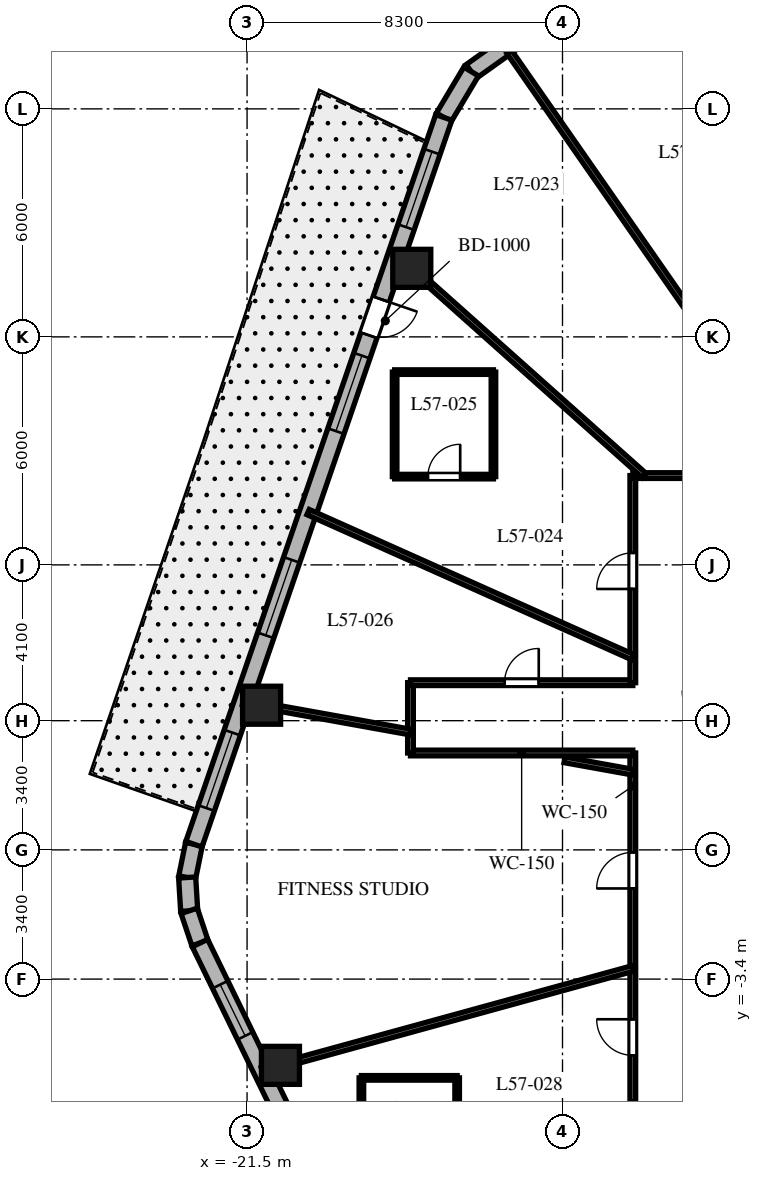
"""IFC4 building model, lengths in metres.
Left out: names, types, materials, properties, quantities, classifications, styles, units other than length and angle.
Written with IfcOpenShell. Run it as: python <this file> out.ifc"""

import sys

from ifc_helpers import new_model, si_unit, direction, frame, frame_2d, origin, origin_2d, place, context, subcontext, project, spatial, rectangle, extrude, element, fill, save


model = new_model("IFC4")
c1 = context("Model", 3, precision=1e-05, world=origin(), true_north=direction((0.0, 1.0)))
c2 = subcontext(c1, "Body", "Model", "MODEL_VIEW")
j1 = project(units=[si_unit("LENGTHUNIT", "METRE"), si_unit("PLANEANGLEUNIT", "RADIAN")], contexts=[c1])
p1 = place(None, origin())
s1 = spatial("IfcSite", under=j1, at=p1, CompositionType="ELEMENT")
p2 = place(p1, origin())
s2 = spatial("IfcBuilding", under=s1, at=p2, CompositionType="ELEMENT")
p3 = place(p2, frame((0.0, 0.0, 229.3)))
s3 = spatial("IfcBuildingStorey", under=s2, at=p3, CompositionType="ELEMENT", Elevation=229.3)
for number, where, z_axis, x_axis in (
    (1, (-17.166, 15.304, 0.0), (0.0, 0.0, 1.0), (1.0, 0.0, 0.0)),
    (2, (-21.118, 3.807, 0.0), (0.0, 0.0, 1.0), (1.0, 0.0, 0.0)),
    (3, (-20.622, -5.67, 0.0), (0.0, 0.0, 1.0), (1.0, 0.0, 0.0)),
):
    element("IfcColumn", number, at=place(p3, frame(where, z_axis=z_axis, x_axis=x_axis)), inside=s3, PredefinedType="COLUMN", context=c2, shape_type="SweptSolid", body=[
        extrude(rectangle(XDim=1.0, YDim=1.0, at=origin_2d()), origin(), (0.0, 0.0, 1.0), 3.8),
    ])
p4 = place(p3, frame((-14.478, 21.287, 0.0), z_axis=(0.0, 0.0, 1.0), x_axis=(-0.813888518617, -0.58102106611, 0.0)))
e4 = element("IfcWall", 4, at=p4, inside=s3, PredefinedType="SOLIDWALL", context=c2, shape_type="SweptSolid", body=[
    extrude(rectangle(XDim=1.383, YDim=0.45, at=frame_2d((0.691, 0.0))), origin(), (0.0, 0.0, 1.0), 3.5),
])
p5 = place(p3, frame((-15.604, 20.483, 0.0), z_axis=(0.0, 0.0, 1.0), x_axis=(-0.512222149036, -0.858852996756, 0.0)))
e5 = element("IfcWall", 5, at=p5, inside=s3, PredefinedType="SOLIDWALL", context=c2, shape_type="SweptSolid", body=[
    extrude(rectangle(XDim=1.406, YDim=0.45, at=frame_2d((0.703, 0.0))), origin(), (0.0, 0.0, 1.0), 3.5),
])
p6 = place(p3, frame((-22.898, 0.15, 0.0), z_axis=(0.0, 0.0, 1.0), x_axis=(-0.199055826889, -0.979988151858, 0.0)))
e6 = element("IfcWall", 6, at=p6, inside=s3, PredefinedType="SOLIDWALL", context=c2, shape_type="SweptSolid", body=[
    extrude(rectangle(XDim=0.894, YDim=0.45, at=frame_2d((0.447, 0.0))), origin(), (0.0, 0.0, 1.0), 3.5),
])
p7 = place(p3, frame((-23.076, -0.727, 0.0), z_axis=(0.0, 0.0, 1.0), x_axis=(0.060805222108, -0.998149650586, 0.0)))
e7 = element("IfcWall", 7, at=p7, inside=s3, PredefinedType="SOLIDWALL", context=c2, shape_type="SweptSolid", body=[
    extrude(rectangle(XDim=0.879, YDim=0.45, at=frame_2d((0.44, 0.0))), origin(), (0.0, 0.0, 1.0), 3.5),
])
p8 = place(p3, frame((-23.023, -1.604, 0.0), z_axis=(0.0, 0.0, 1.0), x_axis=(0.316801227695, -0.948491951537, 0.0)))
e8 = element("IfcWall", 8, at=p8, inside=s3, PredefinedType="SOLIDWALL", context=c2, shape_type="SweptSolid", body=[
    extrude(rectangle(XDim=0.894, YDim=0.45, at=frame_2d((0.447, 0.0))), origin(), (0.0, 0.0, 1.0), 3.5),
])
p9 = place(p3, frame((-16.324, 19.275, 0.0), z_axis=(0.0, 0.0, 1.0), x_axis=(-0.325083142304, -0.945685439557, 0.0)))
e9 = element("IfcWall", 9, at=p9, inside=s3, PredefinedType="SOLIDWALL", context=c2, shape_type="SweptSolid", body=[
    extrude(rectangle(XDim=20.224, YDim=0.45, at=frame_2d((10.112, 0.0))), origin(), (0.0, 0.0, 1.0), 3.5),
])
p10 = place(p9, frame((5.062, 0.0, 0.0)))
e10 = element("IfcOpeningElement", 10, at=p10, cuts=e9, PredefinedType="OPENING", context=c2, shape_type="SweptSolid", body=[
    extrude(rectangle(XDim=1.0, YDim=2.15, at=frame_2d((0.5, 1.075))), frame((0.0, 0.235, 0.0), z_axis=(0.0, -1.0, 0.0), x_axis=(1.0, 0.0, 0.0)), (0.0, 0.0, 1.0), 0.47),
])
p11 = place(p9, frame((0.953, 0.0, 0.8)))
e11 = element("IfcOpeningElement", 11, at=p11, cuts=e9, PredefinedType="OPENING", context=c2, shape_type="SweptSolid", body=[
    extrude(rectangle(XDim=2.1, YDim=1.85, at=frame_2d((1.05, 0.925))), frame((0.0, 0.235, 0.0), z_axis=(0.0, -1.0, 0.0), x_axis=(1.0, 0.0, 0.0)), (0.0, 0.0, 1.0), 0.47),
])
p12 = place(p9, frame((6.629, 0.0, 0.8)))
e12 = element("IfcOpeningElement", 12, at=p12, cuts=e9, PredefinedType="OPENING", context=c2, shape_type="SweptSolid", body=[
    extrude(rectangle(XDim=2.1, YDim=1.85, at=frame_2d((1.05, 0.925))), frame((0.0, 0.235, 0.0), z_axis=(0.0, -1.0, 0.0), x_axis=(1.0, 0.0, 0.0)), (0.0, 0.0, 1.0), 0.47),
])
p13 = place(p9, frame((12.312, 0.0, 0.8)))
e13 = element("IfcOpeningElement", 13, at=p13, cuts=e9, PredefinedType="OPENING", context=c2, shape_type="SweptSolid", body=[
    extrude(rectangle(XDim=2.1, YDim=1.85, at=frame_2d((1.05, 0.925))), frame((0.0, 0.235, 0.0), z_axis=(0.0, -1.0, 0.0), x_axis=(1.0, 0.0, 0.0)), (0.0, 0.0, 1.0), 0.47),
])
p14 = place(p9, frame((17.118, 0.0, 0.8)))
e14 = element("IfcOpeningElement", 14, at=p14, cuts=e9, PredefinedType="OPENING", context=c2, shape_type="SweptSolid", body=[
    extrude(rectangle(XDim=2.1, YDim=1.85, at=frame_2d((1.05, 0.925))), frame((0.0, 0.235, 0.0), z_axis=(0.0, -1.0, 0.0), x_axis=(1.0, 0.0, 0.0)), (0.0, 0.0, 1.0), 0.47),
])
p15 = place(p3, frame((-22.74, -2.452, 0.0), z_axis=(0.0, 0.0, 1.0), x_axis=(0.437753424814, -0.899095066755, 0.0)))
e15 = element("IfcWall", 15, at=p15, inside=s3, PredefinedType="SOLIDWALL", context=c2, shape_type="SweptSolid", body=[
    extrude(rectangle(XDim=19.137, YDim=0.45, at=frame_2d((9.569, 0.0))), origin(), (0.0, 0.0, 1.0), 3.5),
])
p16 = place(p15, frame((1.216, 0.0, 0.8)))
e16 = element("IfcOpeningElement", 16, at=p16, cuts=e15, PredefinedType="OPENING", context=c2, shape_type="SweptSolid", body=[
    extrude(rectangle(XDim=1.5, YDim=1.8, at=frame_2d((0.75, 0.9))), frame((0.0, 0.235, 0.0), z_axis=(0.0, -1.0, 0.0), x_axis=(1.0, 0.0, 0.0)), (0.0, 0.0, 1.0), 0.47),
])
p17 = place(p15, frame((6.105, 0.0, 0.8)))
e17 = element("IfcOpeningElement", 17, at=p17, cuts=e15, PredefinedType="OPENING", context=c2, shape_type="SweptSolid", body=[
    extrude(rectangle(XDim=1.5, YDim=1.8, at=frame_2d((0.75, 0.9))), frame((0.0, 0.235, 0.0), z_axis=(0.0, -1.0, 0.0), x_axis=(1.0, 0.0, 0.0)), (0.0, 0.0, 1.0), 0.47),
])
p18 = place(p15, frame((11.499, 0.0, 0.8)))
e18 = element("IfcOpeningElement", 18, at=p18, cuts=e15, PredefinedType="OPENING", context=c2, shape_type="SweptSolid", body=[
    extrude(rectangle(XDim=1.5, YDim=1.8, at=frame_2d((0.75, 0.9))), frame((0.0, 0.235, 0.0), z_axis=(0.0, -1.0, 0.0), x_axis=(1.0, 0.0, 0.0)), (0.0, 0.0, 1.0), 0.47),
])
p19 = place(p15, frame((16.473, 0.0, 0.8)))
e19 = element("IfcOpeningElement", 19, at=p19, cuts=e15, PredefinedType="OPENING", context=c2, shape_type="SweptSolid", body=[
    extrude(rectangle(XDim=1.5, YDim=1.8, at=frame_2d((0.75, 0.9))), frame((0.0, 0.235, 0.0), z_axis=(0.0, -1.0, 0.0), x_axis=(1.0, 0.0, 0.0)), (0.0, 0.0, 1.0), 0.47),
])
p20 = place(p3, frame((-11.35, -9.85, 0.0), z_axis=(0.0, 0.0, 1.0), x_axis=(0.0, 1.0, 0.0)))
e20 = element("IfcWall", 20, at=p20, inside=s3, PredefinedType="PARTITIONING", context=c2, shape_type="SweptSolid", body=[
    extrude(rectangle(XDim=12.4, YDim=0.15, at=frame_2d((6.2, 0.0))), origin(), (0.0, 0.0, 1.0), 2.99),
])
p21 = place(p20, frame((8.835, 0.0, 0.0)))
e21 = element("IfcOpeningElement", 21, at=p21, cuts=e20, PredefinedType="OPENING", context=c2, shape_type="SweptSolid", body=[
    extrude(rectangle(XDim=0.95, YDim=2.03, at=frame_2d((0.475, 1.015))), frame((0.0, 0.085, 0.0), z_axis=(0.0, -1.0, 0.0), x_axis=(1.0, 0.0, 0.0)), (0.0, 0.0, 1.0), 0.17),
])
p22 = place(p20, frame((4.443, 0.0, 0.0)))
e22 = element("IfcOpeningElement", 22, at=p22, cuts=e20, PredefinedType="OPENING", context=c2, shape_type="SweptSolid", body=[
    extrude(rectangle(XDim=0.95, YDim=2.03, at=frame_2d((0.475, 1.015))), frame((0.0, 0.085, 0.0), z_axis=(0.0, -1.0, 0.0), x_axis=(1.0, 0.0, 0.0)), (0.0, 0.0, 1.0), 0.17),
])
p23 = place(p20, frame((1.242, 0.0, 0.0)))
e23 = element("IfcOpeningElement", 23, at=p23, cuts=e20, PredefinedType="OPENING", context=c2, shape_type="SweptSolid", body=[
    extrude(rectangle(XDim=0.9, YDim=2.03, at=frame_2d((0.45, 1.015))), frame((0.0, 0.085, 0.0), z_axis=(0.0, -1.0, 0.0), x_axis=(1.0, 0.0, 0.0)), (0.0, 0.0, 1.0), 0.17),
])
p24 = place(p3, frame((-11.35, 2.55, 0.0), z_axis=(0.0, 0.0, 1.0), x_axis=(-1.0, 0.0, 0.0)))
e24 = element("IfcWall", 24, at=p24, inside=s3, PredefinedType="PARTITIONING", context=c2, shape_type="SweptSolid", body=[
    extrude(rectangle(XDim=5.85, YDim=0.15, at=frame_2d((2.925, 0.0))), origin(), (0.0, 0.0, 1.0), 2.94),
])
p25 = place(p3, frame((-17.2, 2.55, 0.0), z_axis=(0.0, 0.0, 1.0), x_axis=(0.0, 1.0, 0.0)))
e25 = element("IfcWall", 25, at=p25, inside=s3, PredefinedType="PARTITIONING", context=c2, shape_type="SweptSolid", body=[
    extrude(rectangle(XDim=1.85, YDim=0.15, at=frame_2d((0.925, 0.0))), origin(), (0.0, 0.0, 1.0), 2.94),
])
p26 = place(p3, frame((-17.2, 4.4, 0.0), z_axis=(0.0, 0.0, 1.0), x_axis=(1.0, 0.0, 0.0)))
e26 = element("IfcWall", 26, at=p26, inside=s3, PredefinedType="PARTITIONING", context=c2, shape_type="SweptSolid", body=[
    extrude(rectangle(XDim=5.85, YDim=0.15, at=frame_2d((2.925, 0.0))), origin(), (0.0, 0.0, 1.0), 2.94),
])
p27 = place(p26, frame((2.475, 0.0, 0.0)))
e27 = element("IfcOpeningElement", 27, at=p27, cuts=e26, PredefinedType="OPENING", context=c2, shape_type="SweptSolid", body=[
    extrude(rectangle(XDim=0.9, YDim=2.03, at=frame_2d((0.45, 1.015))), frame((0.0, 0.085, 0.0), z_axis=(0.0, -1.0, 0.0), x_axis=(1.0, 0.0, 0.0)), (0.0, 0.0, 1.0), 0.17),
])
p28 = place(p3, frame((-11.35, 4.4, 0.0), z_axis=(0.0, 0.0, 1.0), x_axis=(0.0, 1.0, 0.0)))
e28 = element("IfcWall", 28, at=p28, inside=s3, PredefinedType="PARTITIONING", context=c2, shape_type="SweptSolid", body=[
    extrude(rectangle(XDim=5.45, YDim=0.15, at=frame_2d((2.725, 0.0))), origin(), (0.0, 0.0, 1.0), 2.99),
])
p29 = place(p28, frame((2.466, 0.0, 0.0)))
e29 = element("IfcOpeningElement", 29, at=p29, cuts=e28, PredefinedType="OPENING", context=c2, shape_type="SweptSolid", body=[
    extrude(rectangle(XDim=0.95, YDim=2.03, at=frame_2d((0.475, 1.015))), frame((0.0, 0.085, 0.0), z_axis=(0.0, -1.0, 0.0), x_axis=(1.0, 0.0, 0.0)), (0.0, 0.0, 1.0), 0.17),
])
p30 = place(p3, frame((-11.35, 9.85, 0.0), z_axis=(0.0, 0.0, 1.0), x_axis=(1.0, 0.0, 0.0)))
e30 = element("IfcWall", 30, at=p30, inside=s3, PredefinedType="PARTITIONING", context=c2, shape_type="SweptSolid", body=[
    extrude(rectangle(XDim=10.43, YDim=0.15, at=frame_2d((5.215, 0.0))), origin(), (0.0, 0.0, 1.0), 2.99),
])
p31 = place(p30, frame((8.387, 0.0, 0.0)))
e31 = element("IfcOpeningElement", 31, at=p31, cuts=e30, PredefinedType="OPENING", context=c2, shape_type="SweptSolid", body=[
    extrude(rectangle(XDim=0.9, YDim=2.03, at=frame_2d((0.45, 1.015))), frame((0.0, 0.085, 0.0), z_axis=(0.0, -1.0, 0.0), x_axis=(1.0, 0.0, 0.0)), (0.0, 0.0, 1.0), 0.17),
])
p32 = place(p30, frame((5.525, 0.0, 0.0)))
e32 = element("IfcOpeningElement", 32, at=p32, cuts=e30, PredefinedType="OPENING", context=c2, shape_type="SweptSolid", body=[
    extrude(rectangle(XDim=0.9, YDim=2.03, at=frame_2d((0.45, 1.015))), frame((0.0, 0.085, 0.0), z_axis=(0.0, -1.0, 0.0), x_axis=(1.0, 0.0, 0.0)), (0.0, 0.0, 1.0), 0.17),
])
p33 = place(p30, frame((1.921, 0.0, 0.0)))
e33 = element("IfcOpeningElement", 33, at=p33, cuts=e30, PredefinedType="OPENING", context=c2, shape_type="SweptSolid", body=[
    extrude(rectangle(XDim=0.9, YDim=2.03, at=frame_2d((0.45, 1.015))), frame((0.0, 0.085, 0.0), z_axis=(0.0, -1.0, 0.0), x_axis=(1.0, 0.0, 0.0)), (0.0, 0.0, 1.0), 0.17),
])
p34 = place(p3, frame((-6.849, 9.85, 0.0), z_axis=(0.0, 0.0, 1.0), x_axis=(-0.570871709026, 0.821039275451, 0.0)))
e34 = element("IfcWall", 34, at=p34, inside=s3, PredefinedType="PARTITIONING", context=c2, shape_type="SweptSolid", body=[
    extrude(rectangle(XDim=13.582, YDim=0.15, at=frame_2d((6.791, 0.0))), origin(), (0.0, 0.0, 1.0), 2.74),
])
p35 = place(p3, frame((-11.048, 9.85, 0.0), z_axis=(0.0, 0.0, 1.0), x_axis=(-0.746444434655, 0.665447748492, 0.0)))
e35 = element("IfcWall", 35, at=p35, inside=s3, PredefinedType="PARTITIONING", context=c2, shape_type="SweptSolid", body=[
    extrude(rectangle(XDim=8.732, YDim=0.15, at=frame_2d((4.366, 0.0))), origin(), (0.0, 0.0, 1.0), 2.74),
])
p36 = place(p3, frame((-11.35, 5.072, 0.0), z_axis=(0.0, 0.0, 1.0), x_axis=(-0.912980177983, 0.408003914944, 0.0)))
e36 = element("IfcWall", 36, at=p36, inside=s3, PredefinedType="PARTITIONING", context=c2, shape_type="SweptSolid", body=[
    extrude(rectangle(XDim=9.358, YDim=0.15, at=frame_2d((4.679, 0.0))), origin(), (0.0, 0.0, 1.0), 2.74),
])
p37 = place(p3, frame((-11.35, 2.046, 0.0), z_axis=(0.0, 0.0, 1.0), x_axis=(-0.984127783205, 0.177461281195, 0.0)))
e37 = element("IfcWall", 37, at=p37, inside=s3, PredefinedType="PARTITIONING", context=c2, shape_type="SweptSolid", body=[
    extrude(rectangle(XDim=1.826, YDim=0.15, at=frame_2d((0.913, 0.0))), origin(), (0.0, 0.0, 1.0), 3.5),
])
p38 = place(p3, frame((-17.2, 3.101, 0.0), z_axis=(0.0, 0.0, 1.0), x_axis=(-0.98413465883, 0.177423147559, 0.0)))
e38 = element("IfcWall", 38, at=p38, inside=s3, PredefinedType="PARTITIONING", context=c2, shape_type="SweptSolid", body=[
    extrude(rectangle(XDim=4.482, YDim=0.15, at=frame_2d((2.241, 0.0))), origin(), (0.0, 0.0, 1.0), 2.74),
])
p39 = place(p3, frame((-11.35, -3.121, 0.0), z_axis=(0.0, 0.0, 1.0), x_axis=(-0.964212793822, -0.265129568758, 0.0)))
e39 = element("IfcWall", 39, at=p39, inside=s3, PredefinedType="PARTITIONING", context=c2, shape_type="SweptSolid", body=[
    extrude(rectangle(XDim=10.12, YDim=0.15, at=frame_2d((5.06, 0.0))), origin(), (0.0, 0.0, 1.0), 2.74),
])
p40 = place(p3, frame((-17.617, 9.823, 0.0), z_axis=(0.0, 0.0, 1.0), x_axis=(1.0, 0.0, 0.0)))
e40 = element("IfcWall", 40, at=p40, inside=s3, PredefinedType="PARTITIONING", context=c2, shape_type="SweptSolid", body=[
    extrude(rectangle(XDim=2.6, YDim=0.12, at=frame_2d((1.3, 0.0))), origin(), (0.0, 0.0, 1.0), 3.072),
])
p41 = place(p40, frame((0.875, 0.0, 0.0)))
e41 = element("IfcOpeningElement", 41, at=p41, cuts=e40, PredefinedType="OPENING", context=c2, shape_type="SweptSolid", body=[
    extrude(rectangle(XDim=0.85, YDim=2.03, at=frame_2d((0.425, 1.015))), frame((0.0, 0.07, 0.0), z_axis=(0.0, -1.0, 0.0), x_axis=(1.0, 0.0, 0.0)), (0.0, 0.0, 1.0), 0.14),
])
p42 = place(p3, frame((-15.017, 9.823, 0.0), z_axis=(0.0, 0.0, 1.0), x_axis=(0.0, 1.0, 0.0)))
e42 = element("IfcWall", 42, at=p42, inside=s3, PredefinedType="PARTITIONING", context=c2, shape_type="SweptSolid", body=[
    extrude(rectangle(XDim=2.75, YDim=0.12, at=frame_2d((1.375, 0.0))), origin(), (0.0, 0.0, 1.0), 3.072),
])
p43 = place(p3, frame((-15.017, 12.573, 0.0), z_axis=(0.0, 0.0, 1.0), x_axis=(-1.0, 0.0, 0.0)))
e43 = element("IfcWall", 43, at=p43, inside=s3, PredefinedType="PARTITIONING", context=c2, shape_type="SweptSolid", body=[
    extrude(rectangle(XDim=2.6, YDim=0.12, at=frame_2d((1.3, 0.0))), origin(), (0.0, 0.0, 1.0), 3.5),
])
p44 = place(p3, frame((-17.617, 12.573, 0.0), z_axis=(0.0, 0.0, 1.0), x_axis=(0.0, -1.0, 0.0)))
e44 = element("IfcWall", 44, at=p44, inside=s3, PredefinedType="PARTITIONING", context=c2, shape_type="SweptSolid", body=[
    extrude(rectangle(XDim=2.75, YDim=0.12, at=frame_2d((1.375, 0.0))), origin(), (0.0, 0.0, 1.0), 3.5),
])
p45 = place(p3, frame((-15.972, -8.679, 0.0), z_axis=(0.0, 0.0, 1.0), x_axis=(0.0, 1.0, 0.0)))
e45 = element("IfcWall", 45, at=p45, inside=s3, PredefinedType="PARTITIONING", context=c2, shape_type="SweptSolid", body=[
    extrude(rectangle(XDim=2.68, YDim=0.12, at=frame_2d((1.34, 0.0))), origin(), (0.0, 0.0, 1.0), 2.99),
])
p46 = place(p3, frame((-15.972, -5.999, 0.0), z_axis=(0.0, 0.0, 1.0), x_axis=(-1.0, 0.0, 0.0)))
e46 = element("IfcWall", 46, at=p46, inside=s3, PredefinedType="PARTITIONING", context=c2, shape_type="SweptSolid", body=[
    extrude(rectangle(XDim=2.52, YDim=0.12, at=frame_2d((1.26, 0.0))), origin(), (0.0, 0.0, 1.0), 2.94),
])
p47 = place(p3, frame((-18.492, -5.999, 0.0), z_axis=(0.0, 0.0, 1.0), x_axis=(0.0, -1.0, 0.0)))
e47 = element("IfcWall", 47, at=p47, inside=s3, PredefinedType="PARTITIONING", context=c2, shape_type="SweptSolid", body=[
    extrude(rectangle(XDim=2.68, YDim=0.12, at=frame_2d((1.34, 0.0))), origin(), (0.0, 0.0, 1.0), 2.99),
])
p48 = place(p10, origin())
e48 = element("IfcDoor", 48, at=p48, inside=s3, OperationType="SINGLE_SWING_LEFT", PredefinedType="DOOR", context=c2, shape_type="SweptSolid", body=[
    extrude(rectangle(XDim=1.0, YDim=2.15, at=frame_2d((0.5, 1.075))), frame((0.0, 0.025, 0.0), z_axis=(0.0, -1.0, 0.0), x_axis=(1.0, 0.0, 0.0)), (0.0, 0.0, 1.0), 0.05),
])
fill(e10, e48)
p49 = place(p11, origin())
e49 = element("IfcWindow", 49, at=p49, inside=s3, PartitioningType="SINGLE_PANEL", PredefinedType="WINDOW", context=c2, shape_type="SweptSolid", body=[
    extrude(rectangle(XDim=2.1, YDim=1.85, at=frame_2d((1.05, 0.925))), frame((0.0, 0.03, 0.0), z_axis=(0.0, -1.0, 0.0), x_axis=(1.0, 0.0, 0.0)), (0.0, 0.0, 1.0), 0.06),
])
fill(e11, e49)
p50 = place(p12, origin())
e50 = element("IfcWindow", 50, at=p50, inside=s3, PartitioningType="SINGLE_PANEL", PredefinedType="WINDOW", context=c2, shape_type="SweptSolid", body=[
    extrude(rectangle(XDim=2.1, YDim=1.85, at=frame_2d((1.05, 0.925))), frame((0.0, 0.03, 0.0), z_axis=(0.0, -1.0, 0.0), x_axis=(1.0, 0.0, 0.0)), (0.0, 0.0, 1.0), 0.06),
])
fill(e12, e50)
p51 = place(p13, origin())
e51 = element("IfcWindow", 51, at=p51, inside=s3, PartitioningType="SINGLE_PANEL", PredefinedType="WINDOW", context=c2, shape_type="SweptSolid", body=[
    extrude(rectangle(XDim=2.1, YDim=1.85, at=frame_2d((1.05, 0.925))), frame((0.0, 0.03, 0.0), z_axis=(0.0, -1.0, 0.0), x_axis=(1.0, 0.0, 0.0)), (0.0, 0.0, 1.0), 0.06),
])
fill(e13, e51)
p52 = place(p14, origin())
e52 = element("IfcWindow", 52, at=p52, inside=s3, PartitioningType="SINGLE_PANEL", PredefinedType="WINDOW", context=c2, shape_type="SweptSolid", body=[
    extrude(rectangle(XDim=2.1, YDim=1.85, at=frame_2d((1.05, 0.925))), frame((0.0, 0.03, 0.0), z_axis=(0.0, -1.0, 0.0), x_axis=(1.0, 0.0, 0.0)), (0.0, 0.0, 1.0), 0.06),
])
fill(e14, e52)
p53 = place(p16, origin())
e53 = element("IfcWindow", 53, at=p53, inside=s3, PartitioningType="SINGLE_PANEL", PredefinedType="WINDOW", context=c2, shape_type="SweptSolid", body=[
    extrude(rectangle(XDim=1.5, YDim=1.8, at=frame_2d((0.75, 0.9))), frame((0.0, 0.03, 0.0), z_axis=(0.0, -1.0, 0.0), x_axis=(1.0, 0.0, 0.0)), (0.0, 0.0, 1.0), 0.06),
])
fill(e16, e53)
p54 = place(p29, origin())
e54 = element("IfcDoor", 54, at=p54, inside=s3, OperationType="SINGLE_SWING_LEFT", PredefinedType="DOOR", context=c2, shape_type="SweptSolid", body=[
    extrude(rectangle(XDim=0.95, YDim=2.03, at=frame_2d((0.475, 1.015))), frame((0.0, 0.025, 0.0), z_axis=(0.0, -1.0, 0.0), x_axis=(1.0, 0.0, 0.0)), (0.0, 0.0, 1.0), 0.05),
])
fill(e29, e54)
p55 = place(p41, origin())
e55 = element("IfcDoor", 55, at=p55, inside=s3, OperationType="SINGLE_SWING_RIGHT", PredefinedType="DOOR", context=c2, shape_type="SweptSolid", body=[
    extrude(rectangle(XDim=0.85, YDim=2.03, at=frame_2d((0.425, 1.015))), frame((0.0, 0.025, 0.0), z_axis=(0.0, -1.0, 0.0), x_axis=(1.0, 0.0, 0.0)), (0.0, 0.0, 1.0), 0.05),
])
fill(e41, e55)
p56 = place(p27, origin())
e56 = element("IfcDoor", 56, at=p56, inside=s3, OperationType="SINGLE_SWING_RIGHT", PredefinedType="DOOR", context=c2, shape_type="SweptSolid", body=[
    extrude(rectangle(XDim=0.9, YDim=2.03, at=frame_2d((0.45, 1.015))), frame((0.0, 0.025, 0.0), z_axis=(0.0, -1.0, 0.0), x_axis=(1.0, 0.0, 0.0)), (0.0, 0.0, 1.0), 0.05),
])
fill(e27, e56)
p57 = place(p21, origin())
e57 = element("IfcDoor", 57, at=p57, inside=s3, OperationType="SINGLE_SWING_LEFT", PredefinedType="DOOR", context=c2, shape_type="SweptSolid", body=[
    extrude(rectangle(XDim=0.95, YDim=2.03, at=frame_2d((0.475, 1.015))), frame((0.0, 0.025, 0.0), z_axis=(0.0, -1.0, 0.0), x_axis=(1.0, 0.0, 0.0)), (0.0, 0.0, 1.0), 0.05),
])
fill(e21, e57)
p58 = place(p22, origin())
e58 = element("IfcDoor", 58, at=p58, inside=s3, OperationType="SINGLE_SWING_RIGHT", PredefinedType="DOOR", context=c2, shape_type="SweptSolid", body=[
    extrude(rectangle(XDim=0.95, YDim=2.03, at=frame_2d((0.475, 1.015))), frame((0.0, 0.025, 0.0), z_axis=(0.0, -1.0, 0.0), x_axis=(1.0, 0.0, 0.0)), (0.0, 0.0, 1.0), 0.05),
])
fill(e22, e58)
save(model, sys.argv[1])
